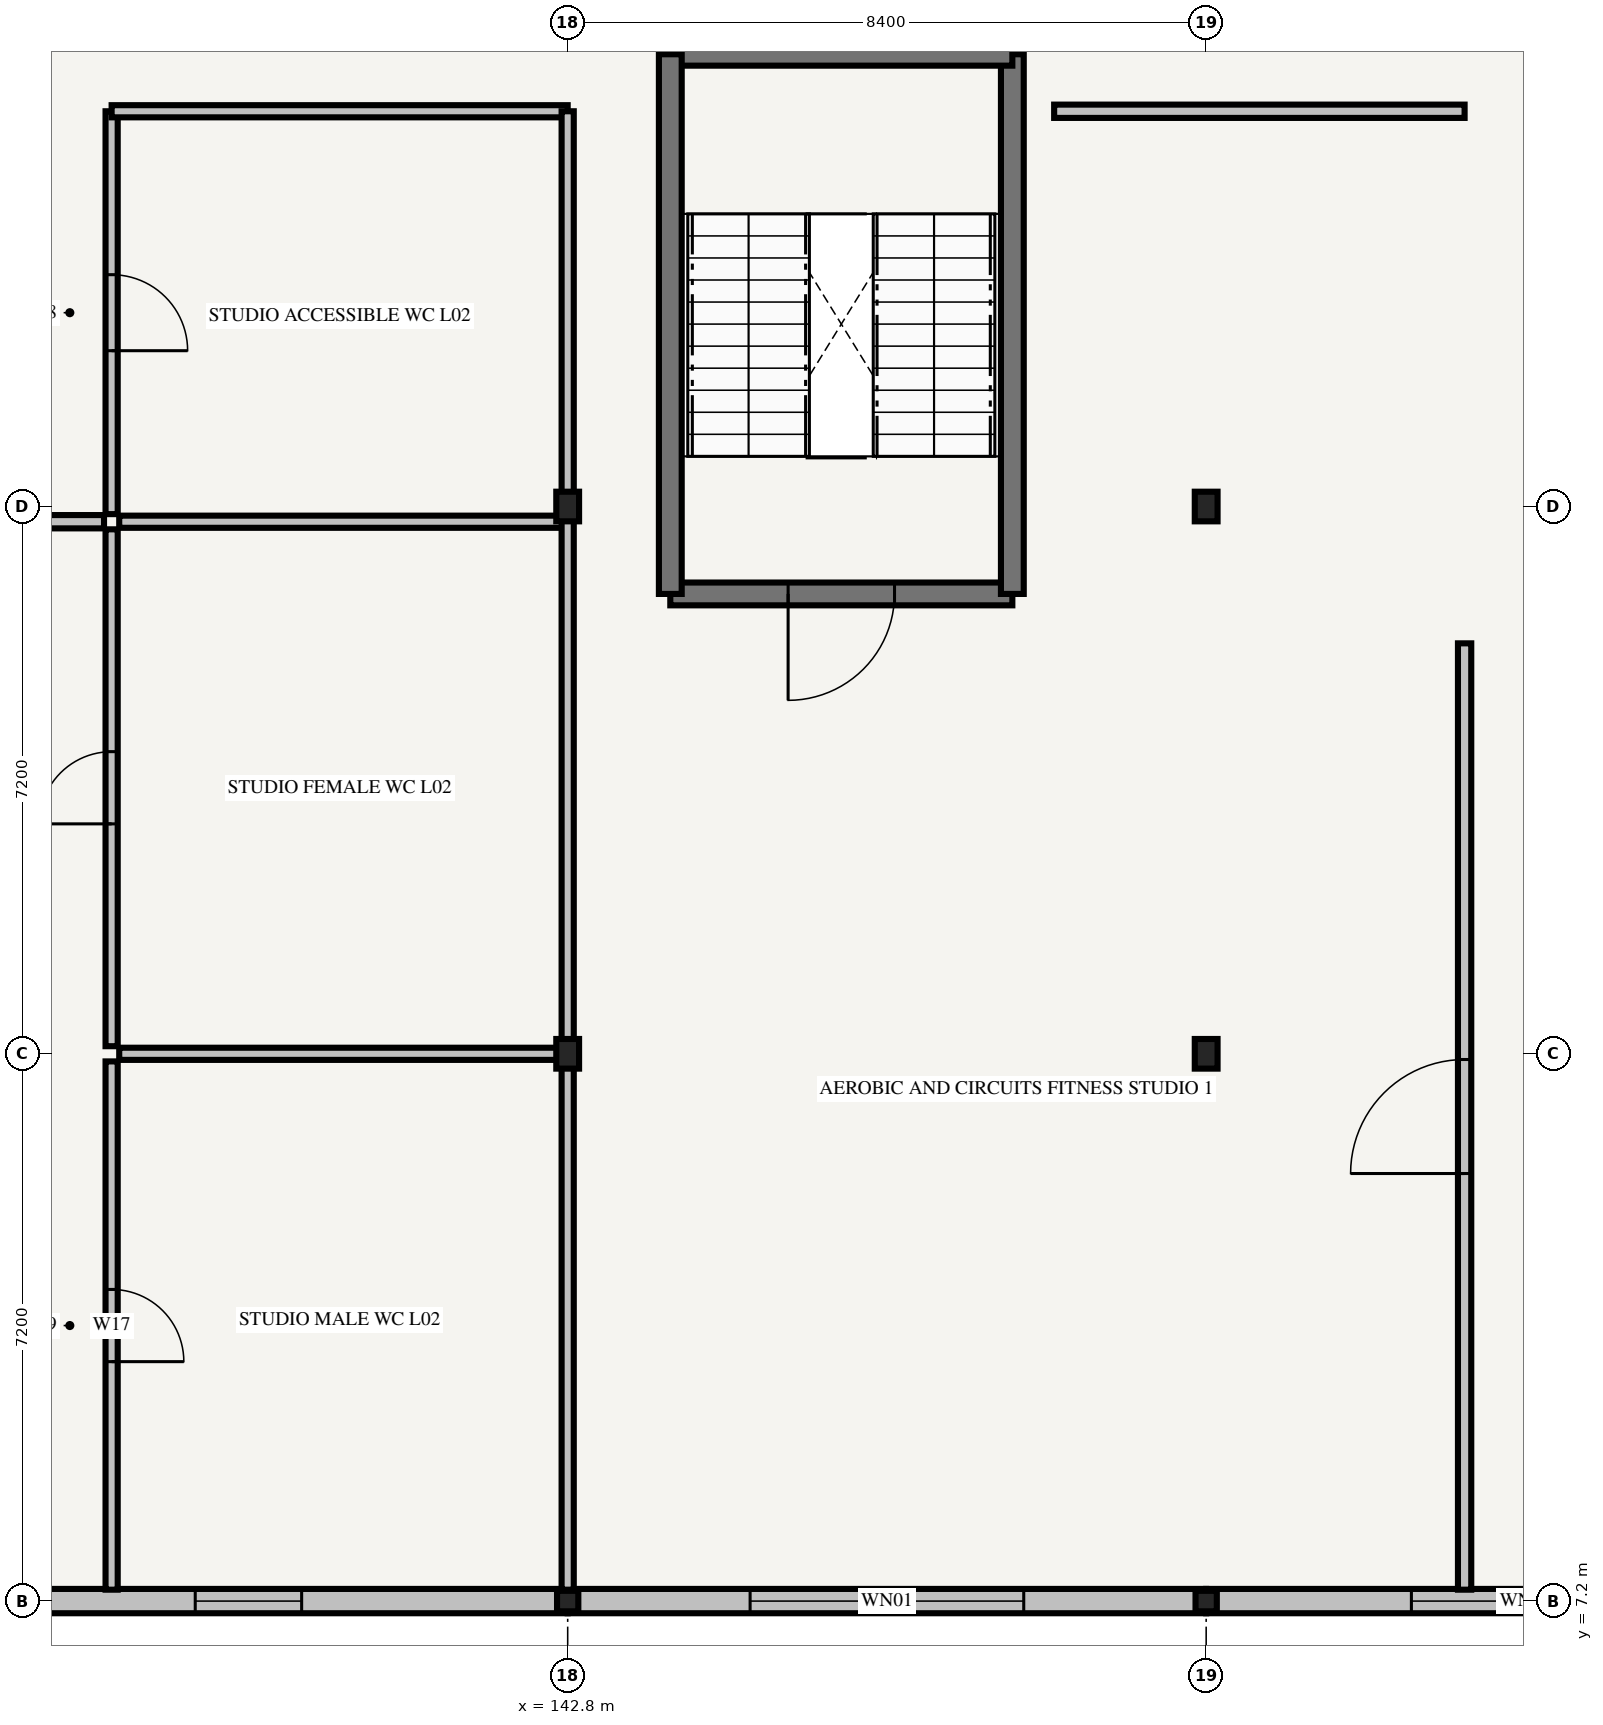
"""IFC4 building model, lengths in metres.
Left out: names, types, materials, properties, quantities, classifications, styles, units other than length and angle.
Written with IfcOpenShell. Run it as: python <this file> out.ifc"""

import sys

from ifc_helpers import new_model, si_unit, direction, frame, frame_2d, origin, origin_2d, place, context, subcontext, project, spatial, rectangle, i_section, extrude, element, fill, save


model = new_model("IFC4")
c1 = context("Model", 3, precision=1e-05, world=origin(), true_north=direction((0.0, 1.0)))
c2 = subcontext(c1, "Body", "Model", "MODEL_VIEW")
j1 = project(units=[si_unit("LENGTHUNIT", "METRE"), si_unit("PLANEANGLEUNIT", "RADIAN")], contexts=[c1])
p1 = place(None, origin())
s1 = spatial("IfcSite", under=j1, at=p1, CompositionType="ELEMENT")
p2 = place(p1, origin())
s2 = spatial("IfcBuilding", under=s1, at=p2, CompositionType="ELEMENT")
p3 = place(p2, frame((0.0, 0.0, 8.7)))
s3 = spatial("IfcBuildingStorey", under=s2, at=p3, CompositionType="ELEMENT", Elevation=8.7)
p4 = place(p3, frame((142.8, 7.2, 0.0), z_axis=(0.0, 0.0, 1.0), x_axis=(1.0, 0.0, 0.0)))
e1 = element("IfcColumn", 1, at=p4, inside=s3, PredefinedType="COLUMN", context=c2, shape_type="SweptSolid", body=[
    extrude(i_section(OverallWidth=0.28, OverallDepth=0.27, WebThickness=0.008, FlangeThickness=0.013, FilletRadius=0.024, at=origin_2d()), origin(), (0.0, 0.0, 1.0), 4.2),
])
for number, where, z_axis, x_axis in (
    (2, (142.8, 14.4, 0.0), (0.0, 0.0, 1.0), (1.0, 0.0, 0.0)),
    (3, (142.8, 21.6, 0.0), (0.0, 0.0, 1.0), (1.0, 0.0, 0.0)),
):
    element("IfcColumn", number, at=place(p3, frame(where, z_axis=z_axis, x_axis=x_axis)), inside=s3, PredefinedType="COLUMN", context=c2, shape_type="SweptSolid", body=[
        extrude(i_section(OverallWidth=0.3, OverallDepth=0.39, WebThickness=0.011, FlangeThickness=0.019, FilletRadius=0.027, at=origin_2d()), origin(), (0.0, 0.0, 1.0), 4.2),
    ])
p5 = place(p3, frame((151.2, 7.2, 0.0), z_axis=(0.0, 0.0, 1.0), x_axis=(1.0, 0.0, 0.0)))
e4 = element("IfcColumn", 4, at=p5, inside=s3, PredefinedType="COLUMN", context=c2, shape_type="SweptSolid", body=[
    extrude(i_section(OverallWidth=0.28, OverallDepth=0.27, WebThickness=0.008, FlangeThickness=0.013, FilletRadius=0.024, at=origin_2d()), origin(), (0.0, 0.0, 1.0), 4.2),
])
for number, where, z_axis, x_axis in (
    (5, (151.2, 14.4, 0.0), (0.0, 0.0, 1.0), (1.0, 0.0, 0.0)),
    (6, (151.2, 21.6, 0.0), (0.0, 0.0, 1.0), (1.0, 0.0, 0.0)),
):
    element("IfcColumn", number, at=place(p3, frame(where, z_axis=z_axis, x_axis=x_axis)), inside=s3, PredefinedType="COLUMN", context=c2, shape_type="SweptSolid", body=[
        extrude(i_section(OverallWidth=0.3, OverallDepth=0.39, WebThickness=0.011, FlangeThickness=0.019, FilletRadius=0.027, at=origin_2d()), origin(), (0.0, 0.0, 1.0), 4.2),
    ])
p6 = place(p3, frame((134.4, 7.2, 0.0), z_axis=(0.0, 0.0, 1.0), x_axis=(1.0, 0.0, 0.0)))
e7 = element("IfcWall", 7, at=p6, inside=s3, PredefinedType="STANDARD", context=c2, shape_type="SweptSolid", body=[
    extrude(rectangle(XDim=8.4, YDim=0.32, at=frame_2d((4.2, 0.0))), origin(), (0.0, 0.0, 1.0), 3.455),
])
p7 = place(p6, frame((3.5, 0.0, 0.85)))
e8 = element("IfcOpeningElement", 8, at=p7, cuts=e7, PredefinedType="OPENING", context=c2, shape_type="SweptSolid", body=[
    extrude(rectangle(XDim=1.4, YDim=1.2, at=frame_2d((0.7, 0.6))), frame((0.0, 0.185, 0.0), z_axis=(0.0, -1.0, 0.0), x_axis=(1.0, 0.0, 0.0)), (0.0, 0.0, 1.0), 0.37),
])
p8 = place(p3, frame((142.8, 7.2, 0.0), z_axis=(0.0, 0.0, 1.0), x_axis=(1.0, 0.0, 0.0)))
e9 = element("IfcWall", 9, at=p8, inside=s3, PredefinedType="STANDARD", context=c2, shape_type="SweptSolid", body=[
    extrude(rectangle(XDim=8.4, YDim=0.32, at=frame_2d((4.2, 0.0))), origin(), (0.0, 0.0, 1.0), 3.405),
])
p9 = place(p8, frame((2.4, 0.0, 0.85)))
e10 = element("IfcOpeningElement", 10, at=p9, cuts=e9, PredefinedType="OPENING", context=c2, shape_type="SweptSolid", body=[
    extrude(rectangle(XDim=3.6, YDim=2.4, at=frame_2d((1.8, 1.2))), frame((0.0, 0.185, 0.0), z_axis=(0.0, -1.0, 0.0), x_axis=(1.0, 0.0, 0.0)), (0.0, 0.0, 1.0), 0.37),
])
p10 = place(p3, frame((151.2, 7.2, 0.0), z_axis=(0.0, 0.0, 1.0), x_axis=(1.0, 0.0, 0.0)))
e11 = element("IfcWall", 11, at=p10, inside=s3, PredefinedType="STANDARD", context=c2, shape_type="SweptSolid", body=[
    extrude(rectangle(XDim=8.4, YDim=0.32, at=frame_2d((4.2, 0.0))), origin(), (0.0, 0.0, 1.0), 3.405),
])
p11 = place(p10, frame((2.7, 0.0, 0.85)))
e12 = element("IfcOpeningElement", 12, at=p11, cuts=e11, PredefinedType="OPENING", context=c2, shape_type="SweptSolid", body=[
    extrude(rectangle(XDim=3.0, YDim=2.4, at=frame_2d((1.5, 1.2))), frame((0.0, 0.185, 0.0), z_axis=(0.0, -1.0, 0.0), x_axis=(1.0, 0.0, 0.0)), (0.0, 0.0, 1.0), 0.37),
])
p12 = place(p3, frame((144.15, 20.45, 0.0), z_axis=(0.0, 0.0, 1.0), x_axis=(1.0, 0.0, 0.0)))
e13 = element("IfcWall", 13, at=p12, inside=s3, PredefinedType="SHEAR", context=c2, shape_type="SweptSolid", body=[
    extrude(rectangle(XDim=4.5, YDim=0.3, at=frame_2d((2.25, 0.0))), origin(), (0.0, 0.0, 1.0), 4.0),
])
p13 = place(p12, frame((1.55, 0.0, 0.0)))
e14 = element("IfcOpeningElement", 14, at=p13, cuts=e13, PredefinedType="OPENING", context=c2, shape_type="SweptSolid", body=[
    extrude(rectangle(XDim=1.4, YDim=2.2, at=frame_2d((0.7, 1.1))), frame((0.0, 0.175, 0.0), z_axis=(0.0, -1.0, 0.0), x_axis=(1.0, 0.0, 0.0)), (0.0, 0.0, 1.0), 0.35),
])
p14 = place(p3, frame((148.65, 20.45, 0.0), z_axis=(0.0, 0.0, 1.0), x_axis=(0.0, 1.0, 0.0)))
e15 = element("IfcWall", 15, at=p14, inside=s3, PredefinedType="SHEAR", context=c2, shape_type="SweptSolid", body=[
    extrude(rectangle(XDim=7.1, YDim=0.3, at=frame_2d((3.55, 0.0))), origin(), (0.0, 0.0, 1.0), 4.0),
])
p15 = place(p3, frame((148.65, 27.55, 0.0), z_axis=(0.0, 0.0, 1.0), x_axis=(-1.0, 0.0, 0.0)))
e16 = element("IfcWall", 16, at=p15, inside=s3, PredefinedType="SHEAR", context=c2, shape_type="SweptSolid", body=[
    extrude(rectangle(XDim=4.5, YDim=0.3, at=frame_2d((2.25, 0.0))), origin(), (0.0, 0.0, 1.0), 4.0),
])
p16 = place(p3, frame((144.15, 27.55, 0.0), z_axis=(0.0, 0.0, 1.0), x_axis=(0.0, -1.0, 0.0)))
e17 = element("IfcWall", 17, at=p16, inside=s3, PredefinedType="SHEAR", context=c2, shape_type="SweptSolid", body=[
    extrude(rectangle(XDim=7.1, YDim=0.3, at=frame_2d((3.55, 0.0))), origin(), (0.0, 0.0, 1.0), 4.0),
])
p17 = place(p3, frame((117.75, 21.4, 0.0), z_axis=(0.0, 0.0, 1.0), x_axis=(1.0, 0.0, 0.0)))
e18 = element("IfcWall", 18, at=p17, inside=s3, PredefinedType="PARTITIONING", context=c2, shape_type="SweptSolid", body=[
    extrude(rectangle(XDim=18.95, YDim=0.175, at=frame_2d((9.475, 0.0))), origin(), (0.0, 0.0, 1.0), 3.32),
])
p18 = place(p17, frame((4.725, 0.0, 0.0)))
e19 = element("IfcOpeningElement", 19, at=p18, cuts=e18, PredefinedType="OPENING", context=c2, shape_type="SweptSolid", body=[
    extrude(rectangle(XDim=1.5, YDim=2.2, at=frame_2d((0.75, 1.1))), frame((0.0, 0.112, 0.0), z_axis=(0.0, -1.0, 0.0), x_axis=(1.0, 0.0, 0.0)), (0.0, 0.0, 1.0), 0.225),
])
p19 = place(p3, frame((136.8, 7.35, 0.0), z_axis=(0.0, 0.0, 1.0), x_axis=(0.0, 1.0, 0.0)))
e20 = element("IfcWall", 20, at=p19, inside=s3, PredefinedType="PARTITIONING", context=c2, shape_type="SweptSolid", body=[
    extrude(rectangle(XDim=6.95, YDim=0.16, at=frame_2d((3.475, 0.0))), origin(), (0.0, 0.0, 1.0), 3.32),
])
p20 = place(p19, frame((3.0, 0.0, 0.0)))
e21 = element("IfcOpeningElement", 21, at=p20, cuts=e20, PredefinedType="OPENING", context=c2, shape_type="SweptSolid", body=[
    extrude(rectangle(XDim=0.95, YDim=2.15, at=frame_2d((0.475, 1.075))), frame((0.0, 0.105, 0.0), z_axis=(0.0, -1.0, 0.0), x_axis=(1.0, 0.0, 0.0)), (0.0, 0.0, 1.0), 0.21),
])
p21 = place(p3, frame((136.8, 14.5, 0.0), z_axis=(0.0, 0.0, 1.0), x_axis=(0.0, 1.0, 0.0)))
e22 = element("IfcWall", 22, at=p21, inside=s3, PredefinedType="PARTITIONING", context=c2, shape_type="SweptSolid", body=[
    extrude(rectangle(XDim=6.8, YDim=0.16, at=frame_2d((3.4, 0.0))), origin(), (0.0, 0.0, 1.0), 3.32),
])
p22 = place(p21, frame((2.925, 0.0, 0.0)))
e23 = element("IfcOpeningElement", 23, at=p22, cuts=e22, PredefinedType="OPENING", context=c2, shape_type="SweptSolid", body=[
    extrude(rectangle(XDim=0.95, YDim=2.15, at=frame_2d((0.475, 1.075))), frame((0.0, 0.105, 0.0), z_axis=(0.0, -1.0, 0.0), x_axis=(1.0, 0.0, 0.0)), (0.0, 0.0, 1.0), 0.21),
])
p23 = place(p3, frame((136.8, 21.5, 0.0), z_axis=(0.0, 0.0, 1.0), x_axis=(0.0, 1.0, 0.0)))
e24 = element("IfcWall", 24, at=p23, inside=s3, PredefinedType="PARTITIONING", context=c2, shape_type="SweptSolid", body=[
    extrude(rectangle(XDim=5.3, YDim=0.16, at=frame_2d((2.65, 0.0))), origin(), (0.0, 0.0, 1.0), 3.32),
])
p24 = place(p23, frame((2.15, 0.0, 0.0)))
e25 = element("IfcOpeningElement", 25, at=p24, cuts=e24, PredefinedType="OPENING", context=c2, shape_type="SweptSolid", body=[
    extrude(rectangle(XDim=1.0, YDim=2.15, at=frame_2d((0.5, 1.075))), frame((0.0, 0.105, 0.0), z_axis=(0.0, -1.0, 0.0), x_axis=(1.0, 0.0, 0.0)), (0.0, 0.0, 1.0), 0.21),
])
for number, where, z_axis, x_axis in (
    (26, (136.9, 14.4, 0.0), (0.0, 0.0, 1.0), (1.0, 0.0, 0.0)),
    (27, (136.9, 21.4, 0.0), (0.0, 0.0, 1.0), (1.0, 0.0, 0.0)),
):
    element("IfcWall", number, at=place(p3, frame(where, z_axis=z_axis, x_axis=x_axis)), inside=s3, PredefinedType="PARTITIONING", context=c2, shape_type="SweptSolid", body=[
        extrude(rectangle(XDim=5.9, YDim=0.16, at=frame_2d((2.95, 0.0))), origin(), (0.0, 0.0, 1.0), 3.32),
    ])
p25 = place(p3, frame((136.8, 26.8, 0.0), z_axis=(0.0, 0.0, 1.0), x_axis=(1.0, 0.0, 0.0)))
e28 = element("IfcWall", 28, at=p25, inside=s3, PredefinedType="PARTITIONING", context=c2, shape_type="SweptSolid", body=[
    extrude(rectangle(XDim=6.0, YDim=0.16, at=frame_2d((3.0, 0.0))), origin(), (0.0, 0.0, 1.0), 3.32),
])
p26 = place(p3, frame((142.8, 7.35, 0.0), z_axis=(0.0, 0.0, 1.0), x_axis=(0.0, 1.0, 0.0)))
e29 = element("IfcWall", 29, at=p26, inside=s3, PredefinedType="PARTITIONING", context=c2, shape_type="SweptSolid", body=[
    extrude(rectangle(XDim=19.45, YDim=0.16, at=frame_2d((9.725, 0.0))), origin(), (0.0, 0.0, 1.0), 3.32),
])
p27 = place(p3, frame((154.6, 7.35, 0.0), z_axis=(0.0, 0.0, 1.0), x_axis=(0.0, 1.0, 0.0)))
e30 = element("IfcWall", 30, at=p27, inside=s3, PredefinedType="PARTITIONING", context=c2, shape_type="SweptSolid", body=[
    extrude(rectangle(XDim=12.45, YDim=0.175, at=frame_2d((6.225, 0.0))), origin(), (0.0, 0.0, 1.0), 3.32),
])
p28 = place(p27, frame((5.475, 0.0, 0.0)))
e31 = element("IfcOpeningElement", 31, at=p28, cuts=e30, PredefinedType="OPENING", context=c2, shape_type="SweptSolid", body=[
    extrude(rectangle(XDim=1.5, YDim=2.2, at=frame_2d((0.75, 1.1))), frame((0.0, 0.112, 0.0), z_axis=(0.0, -1.0, 0.0), x_axis=(1.0, 0.0, 0.0)), (0.0, 0.0, 1.0), 0.225),
])
p29 = place(p3, frame((149.2, 26.8, 0.0), z_axis=(0.0, 0.0, 1.0), x_axis=(1.0, 0.0, 0.0)))
e32 = element("IfcWall", 32, at=p29, inside=s3, PredefinedType="PARTITIONING", context=c2, shape_type="SweptSolid", body=[
    extrude(rectangle(XDim=5.4, YDim=0.175, at=frame_2d((2.7, 0.0))), origin(), (0.0, 0.0, 1.0), 3.32),
])
p30 = place(p7, origin())
e33 = element("IfcWindow", 33, at=p30, inside=s3, PartitioningType="SINGLE_PANEL", PredefinedType="WINDOW", context=c2, shape_type="SweptSolid", body=[
    extrude(rectangle(XDim=1.4, YDim=1.2, at=frame_2d((0.7, 0.6))), frame((0.0, 0.03, 0.0), z_axis=(0.0, -1.0, 0.0), x_axis=(1.0, 0.0, 0.0)), (0.0, 0.0, 1.0), 0.06),
])
fill(e8, e33)
p31 = place(p9, origin())
e34 = element("IfcWindow", 34, at=p31, inside=s3, PartitioningType="SINGLE_PANEL", PredefinedType="WINDOW", context=c2, shape_type="SweptSolid", body=[
    extrude(rectangle(XDim=3.6, YDim=2.4, at=frame_2d((1.8, 1.2))), frame((0.0, 0.03, 0.0), z_axis=(0.0, -1.0, 0.0), x_axis=(1.0, 0.0, 0.0)), (0.0, 0.0, 1.0), 0.06),
])
fill(e10, e34)
p32 = place(p11, origin())
e35 = element("IfcWindow", 35, at=p32, inside=s3, PartitioningType="SINGLE_PANEL", PredefinedType="WINDOW", context=c2, shape_type="SweptSolid", body=[
    extrude(rectangle(XDim=3.0, YDim=2.4, at=frame_2d((1.5, 1.2))), frame((0.0, 0.03, 0.0), z_axis=(0.0, -1.0, 0.0), x_axis=(1.0, 0.0, 0.0)), (0.0, 0.0, 1.0), 0.06),
])
fill(e12, e35)
p33 = place(p13, frame((1.4, 0.0, 0.0), z_axis=(0.0, 0.0, 1.0), x_axis=(-1.0, 0.0, 0.0)))
e36 = element("IfcDoor", 36, at=p33, inside=s3, OperationType="SINGLE_SWING_RIGHT", PredefinedType="DOOR", context=c2, shape_type="SweptSolid", body=[
    extrude(rectangle(XDim=1.4, YDim=2.2, at=frame_2d((0.7, 1.1))), frame((0.0, 0.025, 0.0), z_axis=(0.0, -1.0, 0.0), x_axis=(1.0, 0.0, 0.0)), (0.0, 0.0, 1.0), 0.05),
])
fill(e14, e36)
p34 = place(p20, origin())
e37 = element("IfcDoor", 37, at=p34, inside=s3, OperationType="SINGLE_SWING_RIGHT", PredefinedType="DOOR", context=c2, shape_type="SweptSolid", body=[
    extrude(rectangle(XDim=0.95, YDim=2.15, at=frame_2d((0.475, 1.075))), frame((0.0, 0.025, 0.0), z_axis=(0.0, -1.0, 0.0), x_axis=(1.0, 0.0, 0.0)), (0.0, 0.0, 1.0), 0.05),
])
fill(e21, e37)
p35 = place(p22, origin())
e38 = element("IfcDoor", 38, at=p35, inside=s3, OperationType="SINGLE_SWING_LEFT", PredefinedType="DOOR", context=c2, shape_type="SweptSolid", body=[
    extrude(rectangle(XDim=0.95, YDim=2.15, at=frame_2d((0.475, 1.075))), frame((0.0, 0.025, 0.0), z_axis=(0.0, -1.0, 0.0), x_axis=(1.0, 0.0, 0.0)), (0.0, 0.0, 1.0), 0.05),
])
fill(e23, e38)
p36 = place(p24, frame((1.0, 0.0, 0.0), z_axis=(0.0, 0.0, 1.0), x_axis=(-1.0, 0.0, 0.0)))
e39 = element("IfcDoor", 39, at=p36, inside=s3, OperationType="SINGLE_SWING_RIGHT", PredefinedType="DOOR", context=c2, shape_type="SweptSolid", body=[
    extrude(rectangle(XDim=1.0, YDim=2.15, at=frame_2d((0.5, 1.075))), frame((0.0, 0.025, 0.0), z_axis=(0.0, -1.0, 0.0), x_axis=(1.0, 0.0, 0.0)), (0.0, 0.0, 1.0), 0.05),
])
fill(e25, e39)
p37 = place(p28, origin())
e40 = element("IfcDoor", 40, at=p37, inside=s3, OperationType="DOUBLE_DOOR_SINGLE_SWING", PredefinedType="DOOR", context=c2, shape_type="SweptSolid", body=[
    extrude(rectangle(XDim=1.5, YDim=2.2, at=frame_2d((0.75, 1.1))), frame((0.0, 0.025, 0.0), z_axis=(0.0, -1.0, 0.0), x_axis=(1.0, 0.0, 0.0)), (0.0, 0.0, 1.0), 0.05),
])
fill(e31, e40)
save(model, sys.argv[1])
